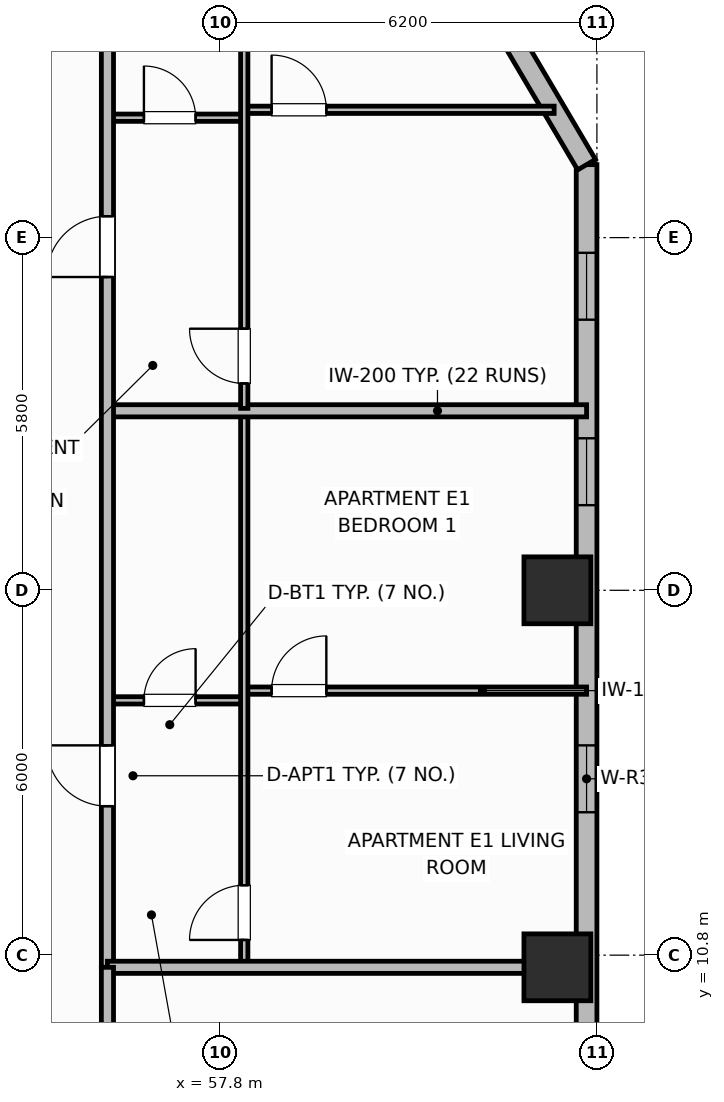
"""IFC4 building model, lengths in metres.
Left out: names, types, materials, properties, quantities, classifications, styles, units other than length and angle.
Written with IfcOpenShell. Run it as: python <this file> out.ifc"""

import sys

from ifc_helpers import new_model, si_unit, direction, frame, frame_2d, origin, origin_2d, place, context, subcontext, project, spatial, rectangle, extrude, element, fill, save


model = new_model("IFC4")
c1 = context("Model", 3, precision=1e-05, world=origin(), true_north=direction((0.0, 1.0)))
c2 = subcontext(c1, "Body", "Model", "MODEL_VIEW")
j1 = project(units=[si_unit("LENGTHUNIT", "METRE"), si_unit("PLANEANGLEUNIT", "RADIAN")], contexts=[c1])
p1 = place(None, origin())
s1 = spatial("IfcSite", under=j1, at=p1, CompositionType="ELEMENT")
p2 = place(p1, origin())
s2 = spatial("IfcBuilding", under=s1, at=p2, CompositionType="ELEMENT")
p3 = place(p2, frame((0.0, 0.0, 110.5)))
s3 = spatial("IfcBuildingStorey", under=s2, at=p3, CompositionType="ELEMENT", Elevation=110.5)
for number, where, z_axis, x_axis in (
    (1, (63.35, 10.6, 0.0), (0.0, 0.0, 1.0), (1.0, 0.0, 0.0)),
    (2, (63.35, 16.8, 0.0), (0.0, 0.0, 1.0), (1.0, 0.0, 0.0)),
):
    element("IfcColumn", number, at=place(p3, frame(where, z_axis=z_axis, x_axis=x_axis)), inside=s3, PredefinedType="COLUMN", context=c2, shape_type="SweptSolid", body=[
        extrude(rectangle(XDim=1.1, YDim=1.1, at=origin_2d()), origin(), (0.0, 0.0, 1.0), 3.7),
    ])
p4 = place(p3, frame((63.83, 9.0, 0.0), z_axis=(0.0, 0.0, 1.0), x_axis=(0.0, 1.0, 0.0)))
e3 = element("IfcWall", 3, at=p4, inside=s3, PredefinedType="SOLIDWALL", context=c2, shape_type="SweptSolid", body=[
    extrude(rectangle(XDim=14.8, YDim=0.34, at=frame_2d((7.4, 0.0))), origin(), (0.0, 0.0, 1.0), 2.7),
])
p5 = place(p4, frame((4.15, 0.0, 0.93)))
e4 = element("IfcOpeningElement", 4, at=p5, cuts=e3, PredefinedType="OPENING", context=c2, shape_type="SweptSolid", body=[
    extrude(rectangle(XDim=1.1, YDim=1.65, at=frame_2d((0.55, 0.825))), frame((0.0, 0.18, 0.0), z_axis=(0.0, -1.0, 0.0), x_axis=(1.0, 0.0, 0.0)), (0.0, 0.0, 1.0), 0.36),
])
p6 = place(p4, frame((9.2, 0.0, 0.93)))
e5 = element("IfcOpeningElement", 5, at=p6, cuts=e3, PredefinedType="OPENING", context=c2, shape_type="SweptSolid", body=[
    extrude(rectangle(XDim=1.1, YDim=1.65, at=frame_2d((0.55, 0.825))), frame((0.0, 0.18, 0.0), z_axis=(0.0, -1.0, 0.0), x_axis=(1.0, 0.0, 0.0)), (0.0, 0.0, 1.0), 0.36),
])
p7 = place(p4, frame((12.25, 0.0, 0.93)))
e6 = element("IfcOpeningElement", 6, at=p7, cuts=e3, PredefinedType="OPENING", context=c2, shape_type="SweptSolid", body=[
    extrude(rectangle(XDim=1.1, YDim=1.65, at=frame_2d((0.55, 0.825))), frame((0.0, 0.18, 0.0), z_axis=(0.0, -1.0, 0.0), x_axis=(1.0, 0.0, 0.0)), (0.0, 0.0, 1.0), 0.36),
])
p8 = place(p3, frame((63.83, 23.8, 0.0), z_axis=(0.0, 0.0, 1.0), x_axis=(-0.508751843651, 0.860913213734, 0.0)))
e7 = element("IfcWall", 7, at=p8, inside=s3, PredefinedType="SOLIDWALL", context=c2, shape_type="SweptSolid", body=[
    extrude(rectangle(XDim=2.555, YDim=0.34, at=frame_2d((1.278, 0.0))), origin(), (0.0, 0.0, 1.0), 2.7),
])
p9 = place(p3, frame((55.95, 14.99, 0.0), z_axis=(0.0, 0.0, 1.0), x_axis=(1.0, 0.0, 0.0)))
e8 = element("IfcWall", 8, at=p9, inside=s3, PredefinedType="PARTITIONING", context=c2, shape_type="SweptSolid", body=[
    extrude(rectangle(XDim=2.25, YDim=0.12, at=frame_2d((1.125, 0.0))), origin(), (0.0, 0.0, 1.0), 2.53),
])
p10 = place(p9, frame((0.6, 0.0, 0.0)))
e9 = element("IfcOpeningElement", 9, at=p10, cuts=e8, PredefinedType="OPENING", context=c2, shape_type="SweptSolid", body=[
    extrude(rectangle(XDim=0.85, YDim=2.1, at=frame_2d((0.425, 1.05))), frame((0.0, 0.07, 0.0), z_axis=(0.0, -1.0, 0.0), x_axis=(1.0, 0.0, 0.0)), (0.0, 0.0, 1.0), 0.14),
])
p11 = place(p3, frame((58.2, 15.15, 0.0), z_axis=(0.0, 0.0, 1.0), x_axis=(1.0, 0.0, 0.0)))
e10 = element("IfcWall", 10, at=p11, inside=s3, PredefinedType="PARTITIONING", context=c2, shape_type="SweptSolid", body=[
    extrude(rectangle(XDim=5.63, YDim=0.12, at=frame_2d((2.815, 0.0))), origin(), (0.0, 0.0, 1.0), 2.53),
])
p12 = place(p11, frame((0.45, 0.0, 0.0)))
e11 = element("IfcOpeningElement", 11, at=p12, cuts=e10, PredefinedType="OPENING", context=c2, shape_type="SweptSolid", body=[
    extrude(rectangle(XDim=0.9, YDim=2.1, at=frame_2d((0.45, 1.05))), frame((0.0, 0.07, 0.0), z_axis=(0.0, -1.0, 0.0), x_axis=(1.0, 0.0, 0.0)), (0.0, 0.0, 1.0), 0.14),
])
p13 = place(p3, frame((58.2, 10.64, 0.0), z_axis=(0.0, 0.0, 1.0), x_axis=(0.0, 1.0, 0.0)))
e12 = element("IfcWall", 12, at=p13, inside=s3, PredefinedType="PARTITIONING", context=c2, shape_type="SweptSolid", body=[
    extrude(rectangle(XDim=9.072, YDim=0.12, at=frame_2d((4.536, 0.0))), origin(), (0.0, 0.0, 1.0), 2.53),
])
p14 = place(p13, frame((0.41, 0.0, 0.0)))
e13 = element("IfcOpeningElement", 13, at=p14, cuts=e12, PredefinedType="OPENING", context=c2, shape_type="SweptSolid", body=[
    extrude(rectangle(XDim=0.9, YDim=2.1, at=frame_2d((0.45, 1.05))), frame((0.0, 0.07, 0.0), z_axis=(0.0, -1.0, 0.0), x_axis=(1.0, 0.0, 0.0)), (0.0, 0.0, 1.0), 0.14),
])
p15 = place(p3, frame((55.95, 19.752, 0.0), z_axis=(0.0, 0.0, 1.0), x_axis=(1.0, 0.0, 0.0)))
e14 = element("IfcWall", 14, at=p15, inside=s3, PredefinedType="PARTITIONING", context=c2, shape_type="SweptSolid", body=[
    extrude(rectangle(XDim=7.88, YDim=0.2, at=frame_2d((3.94, 0.0))), origin(), (0.0, 0.0, 1.0), 2.53),
])
p16 = place(p3, frame((55.95, 24.572, 0.0), z_axis=(0.0, 0.0, 1.0), x_axis=(1.0, 0.0, 0.0)))
e15 = element("IfcWall", 15, at=p16, inside=s3, PredefinedType="PARTITIONING", context=c2, shape_type="SweptSolid", body=[
    extrude(rectangle(XDim=2.25, YDim=0.12, at=frame_2d((1.125, 0.0))), origin(), (0.0, 0.0, 1.0), 2.53),
])
p17 = place(p16, frame((0.6, 0.0, 0.0)))
e16 = element("IfcOpeningElement", 16, at=p17, cuts=e15, PredefinedType="OPENING", context=c2, shape_type="SweptSolid", body=[
    extrude(rectangle(XDim=0.85, YDim=2.1, at=frame_2d((0.425, 1.05))), frame((0.0, 0.07, 0.0), z_axis=(0.0, -1.0, 0.0), x_axis=(1.0, 0.0, 0.0)), (0.0, 0.0, 1.0), 0.14),
])
p18 = place(p3, frame((58.2, 24.702, 0.0), z_axis=(0.0, 0.0, 1.0), x_axis=(1.0, 0.0, 0.0)))
e17 = element("IfcWall", 17, at=p18, inside=s3, PredefinedType="PARTITIONING", context=c2, shape_type="SweptSolid", body=[
    extrude(rectangle(XDim=5.097, YDim=0.12, at=frame_2d((2.549, 0.0))), origin(), (0.0, 0.0, 1.0), 2.53),
])
p19 = place(p18, frame((0.45, 0.0, 0.0)))
e18 = element("IfcOpeningElement", 18, at=p19, cuts=e17, PredefinedType="OPENING", context=c2, shape_type="SweptSolid", body=[
    extrude(rectangle(XDim=0.9, YDim=2.1, at=frame_2d((0.45, 1.05))), frame((0.0, 0.07, 0.0), z_axis=(0.0, -1.0, 0.0), x_axis=(1.0, 0.0, 0.0)), (0.0, 0.0, 1.0), 0.14),
])
p20 = place(p3, frame((58.2, 19.792, 0.0), z_axis=(0.0, 0.0, 1.0), x_axis=(0.0, 1.0, 0.0)))
e19 = element("IfcWall", 19, at=p20, inside=s3, PredefinedType="PARTITIONING", context=c2, shape_type="SweptSolid", body=[
    extrude(rectangle(XDim=9.968, YDim=0.12, at=frame_2d((4.984, 0.0))), origin(), (0.0, 0.0, 1.0), 2.53),
])
p21 = place(p20, frame((0.41, 0.0, 0.0)))
e20 = element("IfcOpeningElement", 20, at=p21, cuts=e19, PredefinedType="OPENING", context=c2, shape_type="SweptSolid", body=[
    extrude(rectangle(XDim=0.9, YDim=2.1, at=frame_2d((0.45, 1.05))), frame((0.0, 0.07, 0.0), z_axis=(0.0, -1.0, 0.0), x_axis=(1.0, 0.0, 0.0)), (0.0, 0.0, 1.0), 0.14),
])
p22 = place(p3, frame((55.95, 10.6, 0.0), z_axis=(0.0, 0.0, 1.0), x_axis=(0.0, 1.0, 0.0)))
e21 = element("IfcWall", 21, at=p22, inside=s3, PredefinedType="PARTITIONING", context=c2, shape_type="SweptSolid", body=[
    extrude(rectangle(XDim=35.2, YDim=0.2, at=frame_2d((17.6, 0.0))), origin(), (0.0, 0.0, 1.0), 2.53),
])
p23 = place(p22, frame((2.65, 0.0, 0.0)))
e22 = element("IfcOpeningElement", 22, at=p23, cuts=e21, PredefinedType="OPENING", context=c2, shape_type="SweptSolid", body=[
    extrude(rectangle(XDim=1.0, YDim=2.15, at=frame_2d((0.5, 1.075))), frame((0.0, 0.11, 0.0), z_axis=(0.0, -1.0, 0.0), x_axis=(1.0, 0.0, 0.0)), (0.0, 0.0, 1.0), 0.22),
])
p24 = place(p22, frame((11.352, 0.0, 0.0)))
e23 = element("IfcOpeningElement", 23, at=p24, cuts=e21, PredefinedType="OPENING", context=c2, shape_type="SweptSolid", body=[
    extrude(rectangle(XDim=1.0, YDim=2.15, at=frame_2d((0.5, 1.075))), frame((0.0, 0.11, 0.0), z_axis=(0.0, -1.0, 0.0), x_axis=(1.0, 0.0, 0.0)), (0.0, 0.0, 1.0), 0.22),
])
p25 = place(p22, frame((21.37, 0.0, 0.0)))
e24 = element("IfcOpeningElement", 24, at=p25, cuts=e21, PredefinedType="OPENING", context=c2, shape_type="SweptSolid", body=[
    extrude(rectangle(XDim=1.0, YDim=2.15, at=frame_2d((0.5, 1.075))), frame((0.0, 0.11, 0.0), z_axis=(0.0, -1.0, 0.0), x_axis=(1.0, 0.0, 0.0)), (0.0, 0.0, 1.0), 0.22),
])
p26 = place(p22, frame((27.302, 0.0, 0.0)))
e25 = element("IfcOpeningElement", 25, at=p26, cuts=e21, PredefinedType="OPENING", context=c2, shape_type="SweptSolid", body=[
    extrude(rectangle(XDim=1.0, YDim=2.15, at=frame_2d((0.5, 1.075))), frame((0.0, 0.11, 0.0), z_axis=(0.0, -1.0, 0.0), x_axis=(1.0, 0.0, 0.0)), (0.0, 0.0, 1.0), 0.22),
])
p27 = place(p3, frame((55.95, 10.6, 0.0), z_axis=(0.0, 0.0, 1.0), x_axis=(1.0, 0.0, 0.0)))
e26 = element("IfcWall", 26, at=p27, inside=s3, PredefinedType="PARTITIONING", context=c2, shape_type="SweptSolid", body=[
    extrude(rectangle(XDim=7.46, YDim=0.2, at=frame_2d((3.73, 0.0))), origin(), (0.0, 0.0, 1.0), 2.53),
])
p28 = place(p3, frame((55.95, 4.97, 0.0), z_axis=(0.0, 0.0, 1.0), x_axis=(0.0, 1.0, 0.0)))
e27 = element("IfcWall", 27, at=p28, inside=s3, PredefinedType="PARTITIONING", context=c2, shape_type="SweptSolid", body=[
    extrude(rectangle(XDim=5.63, YDim=0.2, at=frame_2d((2.815, 0.0))), origin(), (0.0, 0.0, 1.0), 2.53),
])
p29 = place(p5, origin())
e28 = element("IfcWindow", 28, at=p29, inside=s3, PartitioningType="SINGLE_PANEL", PredefinedType="WINDOW", context=c2, shape_type="SweptSolid", body=[
    extrude(rectangle(XDim=1.1, YDim=1.65, at=frame_2d((0.55, 0.825))), frame((0.0, 0.03, 0.0), z_axis=(0.0, -1.0, 0.0), x_axis=(1.0, 0.0, 0.0)), (0.0, 0.0, 1.0), 0.06),
])
fill(e4, e28)
p30 = place(p6, origin())
e29 = element("IfcWindow", 29, at=p30, inside=s3, PartitioningType="SINGLE_PANEL", PredefinedType="WINDOW", context=c2, shape_type="SweptSolid", body=[
    extrude(rectangle(XDim=1.1, YDim=1.65, at=frame_2d((0.55, 0.825))), frame((0.0, 0.03, 0.0), z_axis=(0.0, -1.0, 0.0), x_axis=(1.0, 0.0, 0.0)), (0.0, 0.0, 1.0), 0.06),
])
fill(e5, e29)
p31 = place(p7, origin())
e30 = element("IfcWindow", 30, at=p31, inside=s3, PartitioningType="SINGLE_PANEL", PredefinedType="WINDOW", context=c2, shape_type="SweptSolid", body=[
    extrude(rectangle(XDim=1.1, YDim=1.65, at=frame_2d((0.55, 0.825))), frame((0.0, 0.03, 0.0), z_axis=(0.0, -1.0, 0.0), x_axis=(1.0, 0.0, 0.0)), (0.0, 0.0, 1.0), 0.06),
])
fill(e6, e30)
p32 = place(p10, origin())
e31 = element("IfcDoor", 31, at=p32, inside=s3, OperationType="SINGLE_SWING_RIGHT", PredefinedType="DOOR", context=c2, shape_type="SweptSolid", body=[
    extrude(rectangle(XDim=0.85, YDim=2.1, at=frame_2d((0.425, 1.05))), frame((0.0, 0.025, 0.0), z_axis=(0.0, -1.0, 0.0), x_axis=(1.0, 0.0, 0.0)), (0.0, 0.0, 1.0), 0.05),
])
fill(e9, e31)
p33 = place(p12, origin())
e32 = element("IfcDoor", 32, at=p33, inside=s3, OperationType="SINGLE_SWING_RIGHT", PredefinedType="DOOR", context=c2, shape_type="SweptSolid", body=[
    extrude(rectangle(XDim=0.9, YDim=2.1, at=frame_2d((0.45, 1.05))), frame((0.0, 0.025, 0.0), z_axis=(0.0, -1.0, 0.0), x_axis=(1.0, 0.0, 0.0)), (0.0, 0.0, 1.0), 0.05),
])
fill(e11, e32)
p34 = place(p14, origin())
e33 = element("IfcDoor", 33, at=p34, inside=s3, OperationType="SINGLE_SWING_LEFT", PredefinedType="DOOR", context=c2, shape_type="SweptSolid", body=[
    extrude(rectangle(XDim=0.9, YDim=2.1, at=frame_2d((0.45, 1.05))), frame((0.0, 0.025, 0.0), z_axis=(0.0, -1.0, 0.0), x_axis=(1.0, 0.0, 0.0)), (0.0, 0.0, 1.0), 0.05),
])
fill(e13, e33)
p35 = place(p17, origin())
e34 = element("IfcDoor", 34, at=p35, inside=s3, OperationType="SINGLE_SWING_LEFT", PredefinedType="DOOR", context=c2, shape_type="SweptSolid", body=[
    extrude(rectangle(XDim=0.85, YDim=2.1, at=frame_2d((0.425, 1.05))), frame((0.0, 0.025, 0.0), z_axis=(0.0, -1.0, 0.0), x_axis=(1.0, 0.0, 0.0)), (0.0, 0.0, 1.0), 0.05),
])
fill(e16, e34)
p36 = place(p19, origin())
e35 = element("IfcDoor", 35, at=p36, inside=s3, OperationType="SINGLE_SWING_LEFT", PredefinedType="DOOR", context=c2, shape_type="SweptSolid", body=[
    extrude(rectangle(XDim=0.9, YDim=2.1, at=frame_2d((0.45, 1.05))), frame((0.0, 0.025, 0.0), z_axis=(0.0, -1.0, 0.0), x_axis=(1.0, 0.0, 0.0)), (0.0, 0.0, 1.0), 0.05),
])
fill(e18, e35)
p37 = place(p21, origin())
e36 = element("IfcDoor", 36, at=p37, inside=s3, OperationType="SINGLE_SWING_RIGHT", PredefinedType="DOOR", context=c2, shape_type="SweptSolid", body=[
    extrude(rectangle(XDim=0.9, YDim=2.1, at=frame_2d((0.45, 1.05))), frame((0.0, 0.025, 0.0), z_axis=(0.0, -1.0, 0.0), x_axis=(1.0, 0.0, 0.0)), (0.0, 0.0, 1.0), 0.05),
])
fill(e20, e36)
p38 = place(p23, origin())
e37 = element("IfcDoor", 37, at=p38, inside=s3, OperationType="SINGLE_SWING_RIGHT", PredefinedType="DOOR", context=c2, shape_type="SweptSolid", body=[
    extrude(rectangle(XDim=1.0, YDim=2.15, at=frame_2d((0.5, 1.075))), frame((0.0, 0.025, 0.0), z_axis=(0.0, -1.0, 0.0), x_axis=(1.0, 0.0, 0.0)), (0.0, 0.0, 1.0), 0.05),
])
fill(e22, e37)
p39 = place(p24, origin())
e38 = element("IfcDoor", 38, at=p39, inside=s3, OperationType="SINGLE_SWING_LEFT", PredefinedType="DOOR", context=c2, shape_type="SweptSolid", body=[
    extrude(rectangle(XDim=1.0, YDim=2.15, at=frame_2d((0.5, 1.075))), frame((0.0, 0.025, 0.0), z_axis=(0.0, -1.0, 0.0), x_axis=(1.0, 0.0, 0.0)), (0.0, 0.0, 1.0), 0.05),
])
fill(e23, e38)
save(model, sys.argv[1])
